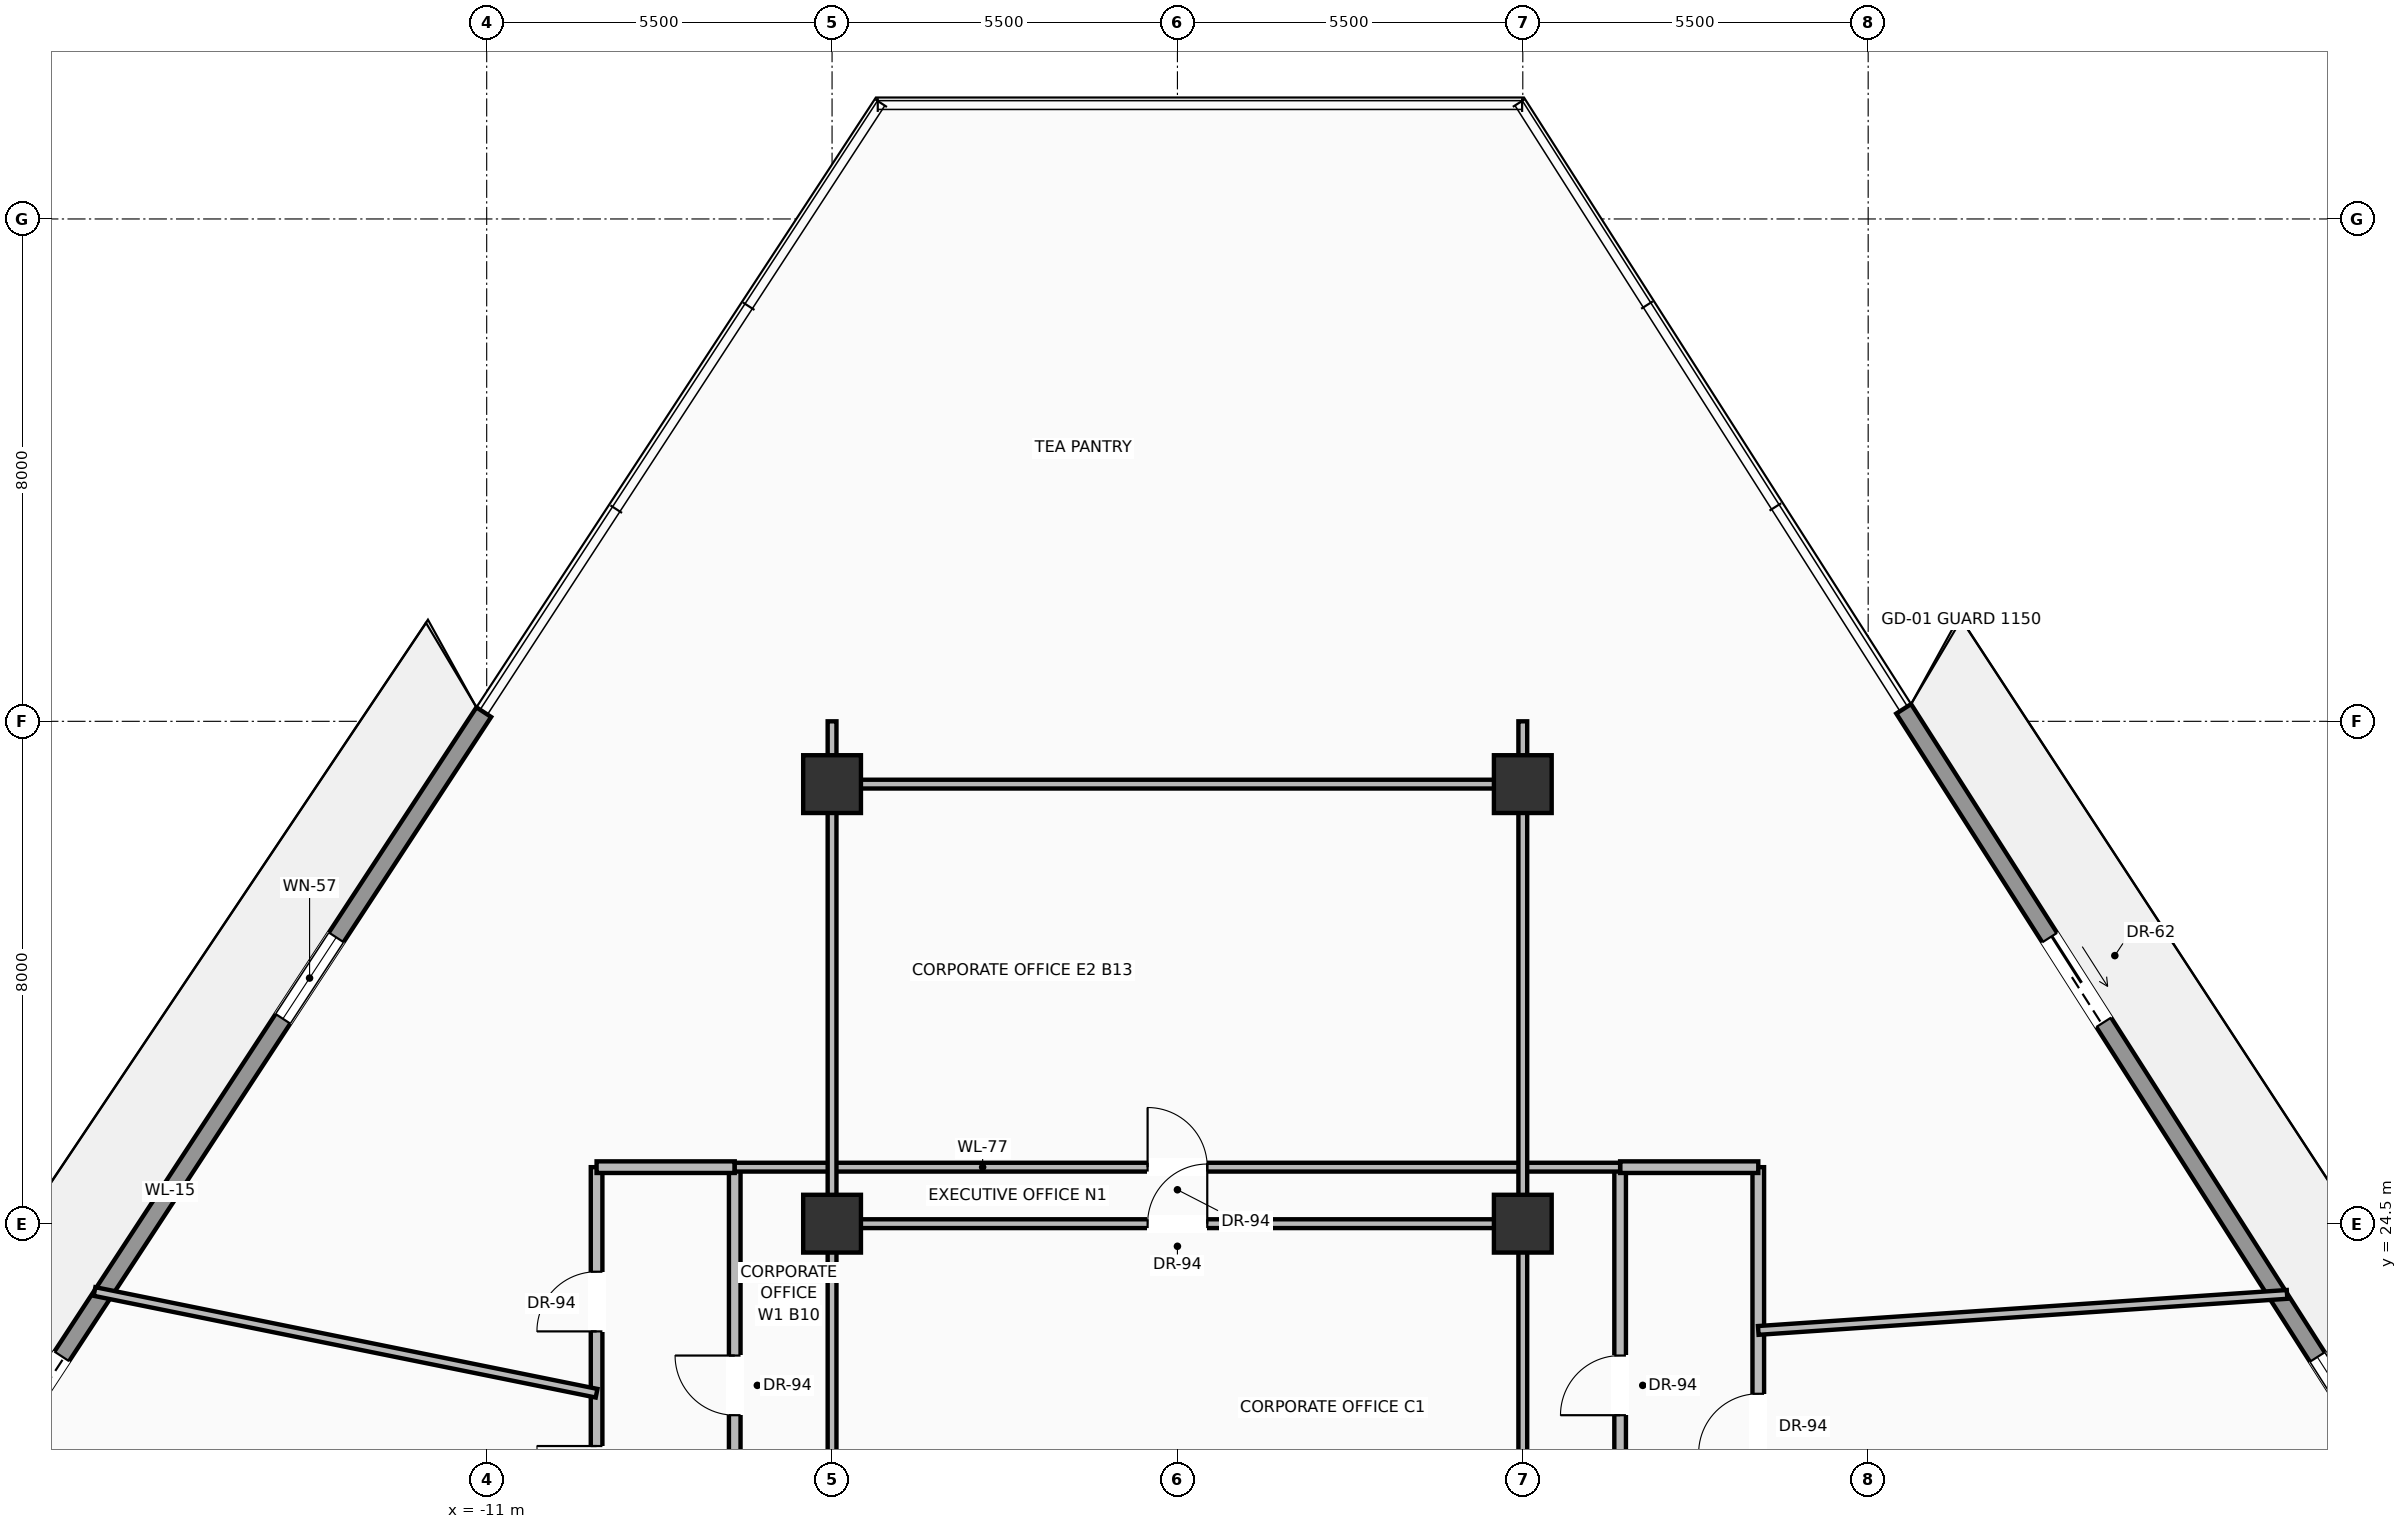
"""IFC4 building model, lengths in metres.
Left out: names, types, materials, properties, quantities, classifications, styles, units other than length and angle.
Written with IfcOpenShell. Run it as: python <this file> out.ifc"""

import sys

from ifc_helpers import new_model, si_unit, direction, frame, frame_2d, origin, origin_2d, place, context, subcontext, project, spatial, rectangle, extrude, source, transform, mapped, element, fill, save


model = new_model("IFC4")
c1 = context("Model", 3, precision=1e-05, world=origin(), true_north=direction((0.0, 1.0)))
c2 = subcontext(c1, "Body", "Model", "MODEL_VIEW")
j1 = project(units=[si_unit("LENGTHUNIT", "METRE"), si_unit("PLANEANGLEUNIT", "RADIAN")], contexts=[c1])
p1 = place(None, origin())
s1 = spatial("IfcSite", under=j1, at=p1, CompositionType="ELEMENT")
p2 = place(p1, origin())
s2 = spatial("IfcBuilding", under=s1, at=p2, CompositionType="ELEMENT")
p3 = place(p2, frame((0.0, 0.0, 133.0)))
s3 = spatial("IfcBuildingStorey", under=s2, at=p3, CompositionType="ELEMENT", Elevation=133.0)
m1 = source(origin(), c2, "Body", "SweptSolid", [
    extrude(rectangle(XDim=0.92, YDim=0.92, at=origin_2d()), origin(), (0.0, 0.0, 1.0), 3.7),
])
for number, where, z_axis, x_axis in (
    (1, (-5.5, 24.5, 0.0), (0.0, 0.0, 1.0), (1.0, 0.0, 0.0)),
    (2, (5.5, 24.5, 0.0), (0.0, 0.0, 1.0), (1.0, 0.0, 0.0)),
    (3, (-5.5, 31.5, 0.0), (0.0, 0.0, 1.0), (1.0, 0.0, 0.0)),
    (4, (5.5, 31.5, 0.0), (0.0, 0.0, 1.0), (1.0, 0.0, 0.0)),
):
    element("IfcColumn", number, at=place(p3, frame(where, z_axis=z_axis, x_axis=x_axis)), inside=s3, PredefinedType="COLUMN", context=c2, shape_type="MappedRepresentation", body=[
        mapped(m1, transform((0.0, 0.0, 0.0), scale=1.0)),
    ])
p4 = place(p3, frame((-21.043, 17.386, 0.0), z_axis=(0.0, 0.0, 1.0), x_axis=(0.547958773701, 0.836505339089, 0.0)))
e5 = element("IfcWall", 5, at=p4, inside=s3, PredefinedType="SOLIDWALL", context=c2, shape_type="SweptSolid", body=[
    extrude(rectangle(XDim=18.243, YDim=0.28, at=frame_2d((9.122, 0.0))), origin(), (0.0, 0.0, 1.0), 3.05),
])
p5 = place(p4, frame((4.378, 0.0, 0.0)))
e6 = element("IfcOpeningElement", 6, at=p5, cuts=e5, PredefinedType="OPENING", context=c2, shape_type="SweptSolid", body=[
    extrude(rectangle(XDim=1.6, YDim=2.35, at=frame_2d((0.8, 1.175))), frame((0.0, 0.15, 0.0), z_axis=(0.0, -1.0, 0.0), x_axis=(1.0, 0.0, 0.0)), (0.0, 0.0, 1.0), 0.3),
])
p6 = place(p4, frame((12.405, 0.0, 0.9)))
e7 = element("IfcOpeningElement", 7, at=p6, cuts=e5, PredefinedType="OPENING", context=c2, shape_type="SweptSolid", body=[
    extrude(rectangle(XDim=1.55, YDim=1.85, at=frame_2d((0.775, 0.925))), frame((0.0, 0.15, 0.0), z_axis=(0.0, -1.0, 0.0), x_axis=(1.0, 0.0, 0.0)), (0.0, 0.0, 1.0), 0.3),
])
p7 = place(p3, frame((11.566, 32.699, 0.0), z_axis=(0.0, 0.0, 1.0), x_axis=(0.537954082698, -0.842974142491, 0.0)))
e8 = element("IfcWall", 8, at=p7, inside=s3, PredefinedType="SOLIDWALL", context=c2, shape_type="SweptSolid", body=[
    extrude(rectangle(XDim=18.008, YDim=0.28, at=frame_2d((9.004, 0.0))), origin(), (0.0, 0.0, 1.0), 3.05),
])
p8 = place(p7, frame((4.322, 0.0, 0.0)))
e9 = element("IfcOpeningElement", 9, at=p8, cuts=e8, PredefinedType="OPENING", context=c2, shape_type="SweptSolid", body=[
    extrude(rectangle(XDim=1.6, YDim=2.35, at=frame_2d((0.8, 1.175))), frame((0.0, 0.15, 0.0), z_axis=(0.0, -1.0, 0.0), x_axis=(1.0, 0.0, 0.0)), (0.0, 0.0, 1.0), 0.3),
])
p9 = place(p7, frame((12.245, 0.0, 0.9)))
e10 = element("IfcOpeningElement", 10, at=p9, cuts=e8, PredefinedType="OPENING", context=c2, shape_type="SweptSolid", body=[
    extrude(rectangle(XDim=1.55, YDim=1.85, at=frame_2d((0.775, 0.925))), frame((0.0, 0.15, 0.0), z_axis=(0.0, -1.0, 0.0), x_axis=(1.0, 0.0, 0.0)), (0.0, 0.0, 1.0), 0.3),
])
p10 = place(p3, frame((-7.05, 18.45, 0.0), z_axis=(0.0, 0.0, 1.0), x_axis=(0.0, 1.0, 0.0)))
e11 = element("IfcWall", 11, at=p10, inside=s3, PredefinedType="PARTITIONING", context=c2, shape_type="SweptSolid", body=[
    extrude(rectangle(XDim=6.95, YDim=0.185, at=frame_2d((3.475, 0.0))), origin(), (0.0, 0.0, 1.0), 2.846),
])
p11 = place(p10, frame((3.0, 0.0, 0.0)))
e12 = element("IfcOpeningElement", 12, at=p11, cuts=e11, PredefinedType="OPENING", context=c2, shape_type="SweptSolid", body=[
    extrude(rectangle(XDim=0.95, YDim=2.2, at=frame_2d((0.475, 1.1))), frame((0.0, 0.103, 0.0), z_axis=(0.0, -1.0, 0.0), x_axis=(1.0, 0.0, 0.0)), (0.0, 0.0, 1.0), 0.205),
])
p12 = place(p3, frame((7.05, 18.45, 0.0), z_axis=(0.0, 0.0, 1.0), x_axis=(0.0, 1.0, 0.0)))
e13 = element("IfcWall", 13, at=p12, inside=s3, PredefinedType="PARTITIONING", context=c2, shape_type="SweptSolid", body=[
    extrude(rectangle(XDim=6.95, YDim=0.185, at=frame_2d((3.475, 0.0))), origin(), (0.0, 0.0, 1.0), 2.846),
])
p13 = place(p12, frame((3.0, 0.0, 0.0)))
e14 = element("IfcOpeningElement", 14, at=p13, cuts=e13, PredefinedType="OPENING", context=c2, shape_type="SweptSolid", body=[
    extrude(rectangle(XDim=0.95, YDim=2.2, at=frame_2d((0.475, 1.1))), frame((0.0, 0.103, 0.0), z_axis=(0.0, -1.0, 0.0), x_axis=(1.0, 0.0, 0.0)), (0.0, 0.0, 1.0), 0.205),
])
p14 = place(p3, frame((-9.25, 16.4, 0.0), z_axis=(0.0, 0.0, 1.0), x_axis=(0.0, 1.0, 0.0)))
e15 = element("IfcWall", 15, at=p14, inside=s3, PredefinedType="PARTITIONING", context=c2, shape_type="SweptSolid", body=[
    extrude(rectangle(XDim=9.0, YDim=0.185, at=frame_2d((4.5, 0.0))), origin(), (0.0, 0.0, 1.0), 2.846),
])
p15 = place(p14, frame((3.609, 0.0, 0.0)))
e16 = element("IfcOpeningElement", 16, at=p15, cuts=e15, PredefinedType="OPENING", context=c2, shape_type="SweptSolid", body=[
    extrude(rectangle(XDim=0.95, YDim=2.2, at=frame_2d((0.475, 1.1))), frame((0.0, 0.103, 0.0), z_axis=(0.0, -1.0, 0.0), x_axis=(1.0, 0.0, 0.0)), (0.0, 0.0, 1.0), 0.205),
])
p16 = place(p14, frame((6.385, 0.0, 0.0)))
e17 = element("IfcOpeningElement", 17, at=p16, cuts=e15, PredefinedType="OPENING", context=c2, shape_type="SweptSolid", body=[
    extrude(rectangle(XDim=0.95, YDim=2.2, at=frame_2d((0.475, 1.1))), frame((0.0, 0.103, 0.0), z_axis=(0.0, -1.0, 0.0), x_axis=(1.0, 0.0, 0.0)), (0.0, 0.0, 1.0), 0.205),
])
p17 = place(p3, frame((9.25, 16.4, 0.0), z_axis=(0.0, 0.0, 1.0), x_axis=(0.0, 1.0, 0.0)))
e18 = element("IfcWall", 18, at=p17, inside=s3, PredefinedType="PARTITIONING", context=c2, shape_type="SweptSolid", body=[
    extrude(rectangle(XDim=9.0, YDim=0.185, at=frame_2d((4.5, 0.0))), origin(), (0.0, 0.0, 1.0), 2.846),
])
p18 = place(p17, frame((4.441, 0.0, 0.0)))
e19 = element("IfcOpeningElement", 19, at=p18, cuts=e18, PredefinedType="OPENING", context=c2, shape_type="SweptSolid", body=[
    extrude(rectangle(XDim=0.95, YDim=2.2, at=frame_2d((0.475, 1.1))), frame((0.0, 0.103, 0.0), z_axis=(0.0, -1.0, 0.0), x_axis=(1.0, 0.0, 0.0)), (0.0, 0.0, 1.0), 0.205),
])
for number, where, z_axis, x_axis in (
    (20, (-9.25, 25.4, 0.0), (0.0, 0.0, 1.0), (1.0, 0.0, 0.0)),
    (21, (7.05, 25.4, 0.0), (0.0, 0.0, 1.0), (1.0, 0.0, 0.0)),
):
    element("IfcWall", number, at=place(p3, frame(where, z_axis=z_axis, x_axis=x_axis)), inside=s3, PredefinedType="PARTITIONING", context=c2, shape_type="SweptSolid", body=[
        extrude(rectangle(XDim=2.2, YDim=0.185, at=frame_2d((1.1, 0.0))), origin(), (0.0, 0.0, 1.0), 3.462),
    ])
p19 = place(p3, frame((-7.05, 25.4, 0.0), z_axis=(0.0, 0.0, 1.0), x_axis=(1.0, 0.0, 0.0)))
e22 = element("IfcWall", 22, at=p19, inside=s3, PredefinedType="PARTITIONING", context=c2, shape_type="SweptSolid", body=[
    extrude(rectangle(XDim=14.1, YDim=0.14, at=frame_2d((7.05, 0.0))), origin(), (0.0, 0.0, 1.0), 3.462),
])
p20 = place(p19, frame((6.575, 0.0, 0.0)))
e23 = element("IfcOpeningElement", 23, at=p20, cuts=e22, PredefinedType="OPENING", context=c2, shape_type="SweptSolid", body=[
    extrude(rectangle(XDim=0.95, YDim=2.2, at=frame_2d((0.475, 1.1))), frame((0.0, 0.08, 0.0), z_axis=(0.0, -1.0, 0.0), x_axis=(1.0, 0.0, 0.0)), (0.0, 0.0, 1.0), 0.16),
])
for number, where, z_axis, x_axis in (
    (24, (-5.5, 18.45, 0.0), (0.0, 0.0, 1.0), (0.0, 1.0, 0.0)),
    (25, (5.5, 18.45, 0.0), (0.0, 0.0, 1.0), (0.0, 1.0, 0.0)),
):
    element("IfcWall", number, at=place(p3, frame(where, z_axis=z_axis, x_axis=x_axis)), inside=s3, PredefinedType="PARTITIONING", context=c2, shape_type="SweptSolid", body=[
        extrude(rectangle(XDim=14.05, YDim=0.14, at=frame_2d((7.025, 0.0))), origin(), (0.0, 0.0, 1.0), 2.846),
    ])
p21 = place(p3, frame((-5.5, 24.5, 0.0), z_axis=(0.0, 0.0, 1.0), x_axis=(1.0, 0.0, 0.0)))
e26 = element("IfcWall", 26, at=p21, inside=s3, PredefinedType="PARTITIONING", context=c2, shape_type="SweptSolid", body=[
    extrude(rectangle(XDim=11.0, YDim=0.14, at=frame_2d((5.5, 0.0))), origin(), (0.0, 0.0, 1.0), 2.846),
])
p22 = place(p21, frame((5.025, 0.0, 0.0)))
e27 = element("IfcOpeningElement", 27, at=p22, cuts=e26, PredefinedType="OPENING", context=c2, shape_type="SweptSolid", body=[
    extrude(rectangle(XDim=0.95, YDim=2.2, at=frame_2d((0.475, 1.1))), frame((0.0, 0.08, 0.0), z_axis=(0.0, -1.0, 0.0), x_axis=(1.0, 0.0, 0.0)), (0.0, 0.0, 1.0), 0.16),
])
p23 = place(p3, frame((-5.5, 31.5, 0.0), z_axis=(0.0, 0.0, 1.0), x_axis=(1.0, 0.0, 0.0)))
e28 = element("IfcWall", 28, at=p23, inside=s3, PredefinedType="PARTITIONING", context=c2, shape_type="SweptSolid", body=[
    extrude(rectangle(XDim=11.0, YDim=0.14, at=frame_2d((5.5, 0.0))), origin(), (0.0, 0.0, 1.0), 2.846),
])
p24 = place(p3, frame((-17.246, 23.42, 0.0), z_axis=(0.0, 0.0, 1.0), x_axis=(0.980088444261, -0.198561429853, 0.0)))
e29 = element("IfcWall", 29, at=p24, inside=s3, PredefinedType="PARTITIONING", context=c2, shape_type="SweptSolid", body=[
    extrude(rectangle(XDim=8.158, YDim=0.14, at=frame_2d((4.079, 0.0))), origin(), (0.0, 0.0, 1.0), 3.049),
])
p25 = place(p3, frame((9.25, 22.8, 0.0), z_axis=(0.0, 0.0, 1.0), x_axis=(0.997687082157, 0.067974157575, 0.0)))
e30 = element("IfcWall", 30, at=p25, inside=s3, PredefinedType="PARTITIONING", context=c2, shape_type="SweptSolid", body=[
    extrude(rectangle(XDim=8.44, YDim=0.14, at=frame_2d((4.22, 0.0))), origin(), (0.0, 0.0, 1.0), 3.462),
])
m2 = source(origin(), c2, "Body", "SweptSolid", [
    extrude(rectangle(XDim=1.6, YDim=2.35, at=frame_2d((0.8, 1.175))), frame((0.0, 0.025, 0.0), z_axis=(0.0, -1.0, 0.0), x_axis=(1.0, 0.0, 0.0)), (0.0, 0.0, 1.0), 0.05),
])
p26 = place(p5, origin())
e31 = element("IfcDoor", 31, at=p26, inside=s3, OperationType="SLIDING_TO_LEFT", PredefinedType="DOOR", context=c2, shape_type="MappedRepresentation", body=[
    mapped(m2, transform((0.0, 0.0, 0.0), scale=1.0)),
])
fill(e6, e31)
m3 = source(origin(), c2, "Body", "SweptSolid", [
    extrude(rectangle(XDim=1.55, YDim=1.85, at=frame_2d((0.775, 0.925))), frame((0.0, 0.03, 0.0), z_axis=(0.0, -1.0, 0.0), x_axis=(1.0, 0.0, 0.0)), (0.0, 0.0, 1.0), 0.06),
])
p27 = place(p6, origin())
e32 = element("IfcWindow", 32, at=p27, inside=s3, PartitioningType="SINGLE_PANEL", PredefinedType="WINDOW", context=c2, shape_type="MappedRepresentation", body=[
    mapped(m3, transform((0.0, 0.0, 0.0), scale=1.0)),
])
fill(e7, e32)
p28 = place(p8, origin())
e33 = element("IfcDoor", 33, at=p28, inside=s3, OperationType="SLIDING_TO_RIGHT", PredefinedType="DOOR", context=c2, shape_type="MappedRepresentation", body=[
    mapped(m2, transform((0.0, 0.0, 0.0), scale=1.0)),
])
fill(e9, e33)
p29 = place(p9, origin())
e34 = element("IfcWindow", 34, at=p29, inside=s3, PartitioningType="SINGLE_PANEL", PredefinedType="WINDOW", context=c2, shape_type="MappedRepresentation", body=[
    mapped(m3, transform((0.0, 0.0, 0.0), scale=1.0)),
])
fill(e10, e34)
m4 = source(origin(), c2, "Body", "SweptSolid", [
    extrude(rectangle(XDim=0.95, YDim=2.2, at=frame_2d((0.475, 1.1))), frame((0.0, 0.025, 0.0), z_axis=(0.0, -1.0, 0.0), x_axis=(1.0, 0.0, 0.0)), (0.0, 0.0, 1.0), 0.05),
])
p30 = place(p15, origin())
e35 = element("IfcDoor", 35, at=p30, inside=s3, OperationType="SINGLE_SWING_RIGHT", PredefinedType="DOOR", context=c2, shape_type="MappedRepresentation", body=[
    mapped(m4, transform((0.0, 0.0, 0.0), scale=1.0)),
])
fill(e16, e35)
p31 = place(p18, origin())
e36 = element("IfcDoor", 36, at=p31, inside=s3, OperationType="SINGLE_SWING_LEFT", PredefinedType="DOOR", context=c2, shape_type="MappedRepresentation", body=[
    mapped(m4, transform((0.0, 0.0, 0.0), scale=1.0)),
])
fill(e19, e36)
p32 = place(p11, origin())
e37 = element("IfcDoor", 37, at=p32, inside=s3, OperationType="SINGLE_SWING_RIGHT", PredefinedType="DOOR", context=c2, shape_type="MappedRepresentation", body=[
    mapped(m4, transform((0.0, 0.0, 0.0), scale=1.0)),
])
fill(e12, e37)
p33 = place(p13, origin())
e38 = element("IfcDoor", 38, at=p33, inside=s3, OperationType="SINGLE_SWING_LEFT", PredefinedType="DOOR", context=c2, shape_type="MappedRepresentation", body=[
    mapped(m4, transform((0.0, 0.0, 0.0), scale=1.0)),
])
fill(e14, e38)
p34 = place(p22, origin())
e39 = element("IfcDoor", 39, at=p34, inside=s3, OperationType="SINGLE_SWING_RIGHT", PredefinedType="DOOR", context=c2, shape_type="MappedRepresentation", body=[
    mapped(m4, transform((0.0, 0.0, 0.0), scale=1.0)),
])
fill(e27, e39)
p35 = place(p16, origin())
e40 = element("IfcDoor", 40, at=p35, inside=s3, OperationType="SINGLE_SWING_LEFT", PredefinedType="DOOR", context=c2, shape_type="MappedRepresentation", body=[
    mapped(m4, transform((0.0, 0.0, 0.0), scale=1.0)),
])
fill(e17, e40)
p36 = place(p20, origin())
e41 = element("IfcDoor", 41, at=p36, inside=s3, OperationType="SINGLE_SWING_LEFT", PredefinedType="DOOR", context=c2, shape_type="MappedRepresentation", body=[
    mapped(m4, transform((0.0, 0.0, 0.0), scale=1.0)),
])
fill(e23, e41)
save(model, sys.argv[1])
